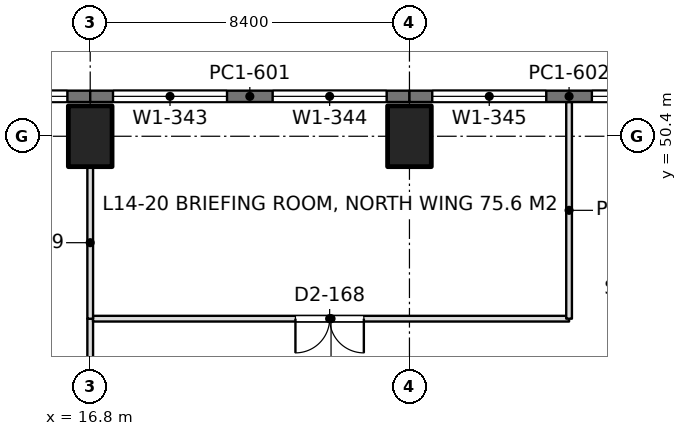
"""IFC4 building model, lengths in metres.
Left out: names, types, materials, properties, quantities, classifications, styles, units other than length and angle.
Written with IfcOpenShell. Run it as: python <this file> out.ifc"""

import sys

from ifc_helpers import new_model, si_unit, direction, frame, frame_2d, origin, origin_2d, place, context, subcontext, project, spatial, rectangle, extrude, element, fill, save


model = new_model("IFC4")
c1 = context("Model", 3, precision=1e-05, world=origin(), true_north=direction((0.0, 1.0)))
c2 = subcontext(c1, "Body", "Model", "MODEL_VIEW")
j1 = project(units=[si_unit("LENGTHUNIT", "METRE"), si_unit("PLANEANGLEUNIT", "RADIAN")], contexts=[c1])
p1 = place(None, origin())
s1 = spatial("IfcSite", under=j1, at=p1, CompositionType="ELEMENT")
p2 = place(p1, origin())
s2 = spatial("IfcBuilding", under=s1, at=p2, CompositionType="ELEMENT")
p3 = place(p2, frame((0.0, 0.0, 63.9)))
s3 = spatial("IfcBuildingStorey", under=s2, at=p3, CompositionType="ELEMENT", Elevation=63.9)
for number, where, z_axis, x_axis in (
    (1, (16.8, 50.4, 0.0), (0.0, 0.0, 1.0), (1.0, 0.0, 0.0)),
    (2, (25.2, 50.4, 0.0), (0.0, 0.0, 1.0), (1.0, 0.0, 0.0)),
):
    element("IfcColumn", number, at=place(p3, frame(where, z_axis=z_axis, x_axis=x_axis)), inside=s3, PredefinedType="COLUMN", context=c2, shape_type="SweptSolid", body=[
        extrude(rectangle(XDim=1.15, YDim=1.6, at=origin_2d()), origin(), (0.0, 0.0, 1.0), 4.5),
    ])
p4 = place(p3, frame((8.4, 51.45, 0.0), z_axis=(0.0, 0.0, 1.0), x_axis=(1.0, 0.0, 0.0)))
e3 = element("IfcWall", 3, at=p4, inside=s3, PredefinedType="SOLIDWALL", context=c2, shape_type="SweptSolid", body=[
    extrude(rectangle(XDim=8.4, YDim=0.3, at=frame_2d((4.2, 0.0))), origin(), (0.0, 0.0, 1.0), 4.34),
])
p5 = place(p4, frame((0.6, 0.0, 0.9)))
e4 = element("IfcOpeningElement", 4, at=p5, cuts=e3, PredefinedType="OPENING", context=c2, shape_type="SweptSolid", body=[
    extrude(rectangle(XDim=3.0, YDim=1.9, at=frame_2d((1.5, 0.95))), frame((0.0, 0.16, 0.0), z_axis=(0.0, -1.0, 0.0), x_axis=(1.0, 0.0, 0.0)), (0.0, 0.0, 1.0), 0.32),
])
p6 = place(p4, frame((4.8, 0.0, 0.9)))
e5 = element("IfcOpeningElement", 5, at=p6, cuts=e3, PredefinedType="OPENING", context=c2, shape_type="SweptSolid", body=[
    extrude(rectangle(XDim=3.0, YDim=1.9, at=frame_2d((1.5, 0.95))), frame((0.0, 0.16, 0.0), z_axis=(0.0, -1.0, 0.0), x_axis=(1.0, 0.0, 0.0)), (0.0, 0.0, 1.0), 0.32),
])
p7 = place(p3, frame((16.8, 51.45, 0.0), z_axis=(0.0, 0.0, 1.0), x_axis=(1.0, 0.0, 0.0)))
e6 = element("IfcWall", 6, at=p7, inside=s3, PredefinedType="SOLIDWALL", context=c2, shape_type="SweptSolid", body=[
    extrude(rectangle(XDim=8.4, YDim=0.3, at=frame_2d((4.2, 0.0))), origin(), (0.0, 0.0, 1.0), 4.34),
])
p8 = place(p7, frame((0.6, 0.0, 0.9)))
e7 = element("IfcOpeningElement", 7, at=p8, cuts=e6, PredefinedType="OPENING", context=c2, shape_type="SweptSolid", body=[
    extrude(rectangle(XDim=3.0, YDim=1.9, at=frame_2d((1.5, 0.95))), frame((0.0, 0.16, 0.0), z_axis=(0.0, -1.0, 0.0), x_axis=(1.0, 0.0, 0.0)), (0.0, 0.0, 1.0), 0.32),
])
p9 = place(p7, frame((4.8, 0.0, 0.9)))
e8 = element("IfcOpeningElement", 8, at=p9, cuts=e6, PredefinedType="OPENING", context=c2, shape_type="SweptSolid", body=[
    extrude(rectangle(XDim=3.0, YDim=1.9, at=frame_2d((1.5, 0.95))), frame((0.0, 0.16, 0.0), z_axis=(0.0, -1.0, 0.0), x_axis=(1.0, 0.0, 0.0)), (0.0, 0.0, 1.0), 0.32),
])
p10 = place(p3, frame((25.2, 51.45, 0.0), z_axis=(0.0, 0.0, 1.0), x_axis=(1.0, 0.0, 0.0)))
e9 = element("IfcWall", 9, at=p10, inside=s3, PredefinedType="SOLIDWALL", context=c2, shape_type="SweptSolid", body=[
    extrude(rectangle(XDim=8.4, YDim=0.3, at=frame_2d((4.2, 0.0))), origin(), (0.0, 0.0, 1.0), 4.34),
])
p11 = place(p10, frame((0.6, 0.0, 0.9)))
e10 = element("IfcOpeningElement", 10, at=p11, cuts=e9, PredefinedType="OPENING", context=c2, shape_type="SweptSolid", body=[
    extrude(rectangle(XDim=3.0, YDim=1.9, at=frame_2d((1.5, 0.95))), frame((0.0, 0.16, 0.0), z_axis=(0.0, -1.0, 0.0), x_axis=(1.0, 0.0, 0.0)), (0.0, 0.0, 1.0), 0.32),
])
p12 = place(p10, frame((4.8, 0.0, 0.9)))
e11 = element("IfcOpeningElement", 11, at=p12, cuts=e9, PredefinedType="OPENING", context=c2, shape_type="SweptSolid", body=[
    extrude(rectangle(XDim=3.0, YDim=1.9, at=frame_2d((1.5, 0.95))), frame((0.0, 0.16, 0.0), z_axis=(0.0, -1.0, 0.0), x_axis=(1.0, 0.0, 0.0)), (0.0, 0.0, 1.0), 0.32),
])
p13 = place(p3, frame((16.874, 45.6, 0.0), z_axis=(0.0, 0.0, 1.0), x_axis=(1.0, 0.0, 0.0)))
e12 = element("IfcWall", 12, at=p13, inside=s3, PredefinedType="PARTITIONING", context=c2, shape_type="SweptSolid", body=[
    extrude(rectangle(XDim=12.526, YDim=0.15, at=frame_2d((6.263, 0.0))), origin(), (0.0, 0.0, 1.0), 3.74),
])
p14 = place(p13, frame((5.326, 0.0, 0.0)))
e13 = element("IfcOpeningElement", 13, at=p14, cuts=e12, PredefinedType="OPENING", context=c2, shape_type="SweptSolid", body=[
    extrude(rectangle(XDim=1.8, YDim=2.2, at=frame_2d((0.9, 1.1))), frame((0.0, 0.085, 0.0), z_axis=(0.0, -1.0, 0.0), x_axis=(1.0, 0.0, 0.0)), (0.0, 0.0, 1.0), 0.17),
])
p15 = place(p3, frame((16.8, 45.598, 0.0), z_axis=(0.0, 0.0, 1.0), x_axis=(0.0, 1.0, 0.0)))
e14 = element("IfcWall", 14, at=p15, inside=s3, PredefinedType="PARTITIONING", context=c2, shape_type="SweptSolid", body=[
    extrude(rectangle(XDim=4.003, YDim=0.15, at=frame_2d((2.001, 0.0))), origin(), (0.0, 0.0, 1.0), 3.74),
])
p16 = place(p3, frame((29.4, 45.6, 0.0), z_axis=(0.0, 0.0, 1.0), x_axis=(0.0, 1.0, 0.0)))
e15 = element("IfcWall", 15, at=p16, inside=s3, PredefinedType="PARTITIONING", context=c2, shape_type="SweptSolid", body=[
    extrude(rectangle(XDim=5.702, YDim=0.15, at=frame_2d((2.851, 0.0))), origin(), (0.0, 0.0, 1.0), 3.84),
])
p17 = place(p3, frame((16.8, 42.899, 0.0), z_axis=(0.0, 0.0, 1.0), x_axis=(0.0, 1.0, 0.0)))
e16 = element("IfcWall", 16, at=p17, inside=s3, PredefinedType="PARTITIONING", context=c2, shape_type="SweptSolid", body=[
    extrude(rectangle(XDim=2.703, YDim=0.15, at=frame_2d((1.352, 0.0))), origin(), (0.0, 0.0, 1.0), 3.74),
])
p18 = place(p6, origin())
e17 = element("IfcWindow", 17, at=p18, inside=s3, PartitioningType="SINGLE_PANEL", PredefinedType="WINDOW", context=c2, shape_type="SweptSolid", body=[
    extrude(rectangle(XDim=3.0, YDim=1.9, at=frame_2d((1.5, 0.95))), frame((0.0, 0.03, 0.0), z_axis=(0.0, -1.0, 0.0), x_axis=(1.0, 0.0, 0.0)), (0.0, 0.0, 1.0), 0.06),
])
fill(e5, e17)
p19 = place(p8, origin())
e18 = element("IfcWindow", 18, at=p19, inside=s3, PartitioningType="SINGLE_PANEL", PredefinedType="WINDOW", context=c2, shape_type="SweptSolid", body=[
    extrude(rectangle(XDim=3.0, YDim=1.9, at=frame_2d((1.5, 0.95))), frame((0.0, 0.03, 0.0), z_axis=(0.0, -1.0, 0.0), x_axis=(1.0, 0.0, 0.0)), (0.0, 0.0, 1.0), 0.06),
])
fill(e7, e18)
p20 = place(p9, origin())
e19 = element("IfcWindow", 19, at=p20, inside=s3, PartitioningType="SINGLE_PANEL", PredefinedType="WINDOW", context=c2, shape_type="SweptSolid", body=[
    extrude(rectangle(XDim=3.0, YDim=1.9, at=frame_2d((1.5, 0.95))), frame((0.0, 0.03, 0.0), z_axis=(0.0, -1.0, 0.0), x_axis=(1.0, 0.0, 0.0)), (0.0, 0.0, 1.0), 0.06),
])
fill(e8, e19)
p21 = place(p11, origin())
e20 = element("IfcWindow", 20, at=p21, inside=s3, PartitioningType="SINGLE_PANEL", PredefinedType="WINDOW", context=c2, shape_type="SweptSolid", body=[
    extrude(rectangle(XDim=3.0, YDim=1.9, at=frame_2d((1.5, 0.95))), frame((0.0, 0.03, 0.0), z_axis=(0.0, -1.0, 0.0), x_axis=(1.0, 0.0, 0.0)), (0.0, 0.0, 1.0), 0.06),
])
fill(e10, e20)
p22 = place(p12, origin())
e21 = element("IfcWindow", 21, at=p22, inside=s3, PartitioningType="SINGLE_PANEL", PredefinedType="WINDOW", context=c2, shape_type="SweptSolid", body=[
    extrude(rectangle(XDim=3.0, YDim=1.9, at=frame_2d((1.5, 0.95))), frame((0.0, 0.03, 0.0), z_axis=(0.0, -1.0, 0.0), x_axis=(1.0, 0.0, 0.0)), (0.0, 0.0, 1.0), 0.06),
])
fill(e11, e21)
p23 = place(p14, frame((1.8, 0.0, 0.0), z_axis=(0.0, 0.0, 1.0), x_axis=(-1.0, 0.0, 0.0)))
e22 = element("IfcDoor", 22, at=p23, inside=s3, OperationType="DOUBLE_DOOR_SINGLE_SWING", PredefinedType="DOOR", context=c2, shape_type="SweptSolid", body=[
    extrude(rectangle(XDim=1.8, YDim=2.2, at=frame_2d((0.9, 1.1))), frame((0.0, 0.025, 0.0), z_axis=(0.0, -1.0, 0.0), x_axis=(1.0, 0.0, 0.0)), (0.0, 0.0, 1.0), 0.05),
])
fill(e13, e22)
save(model, sys.argv[1])
